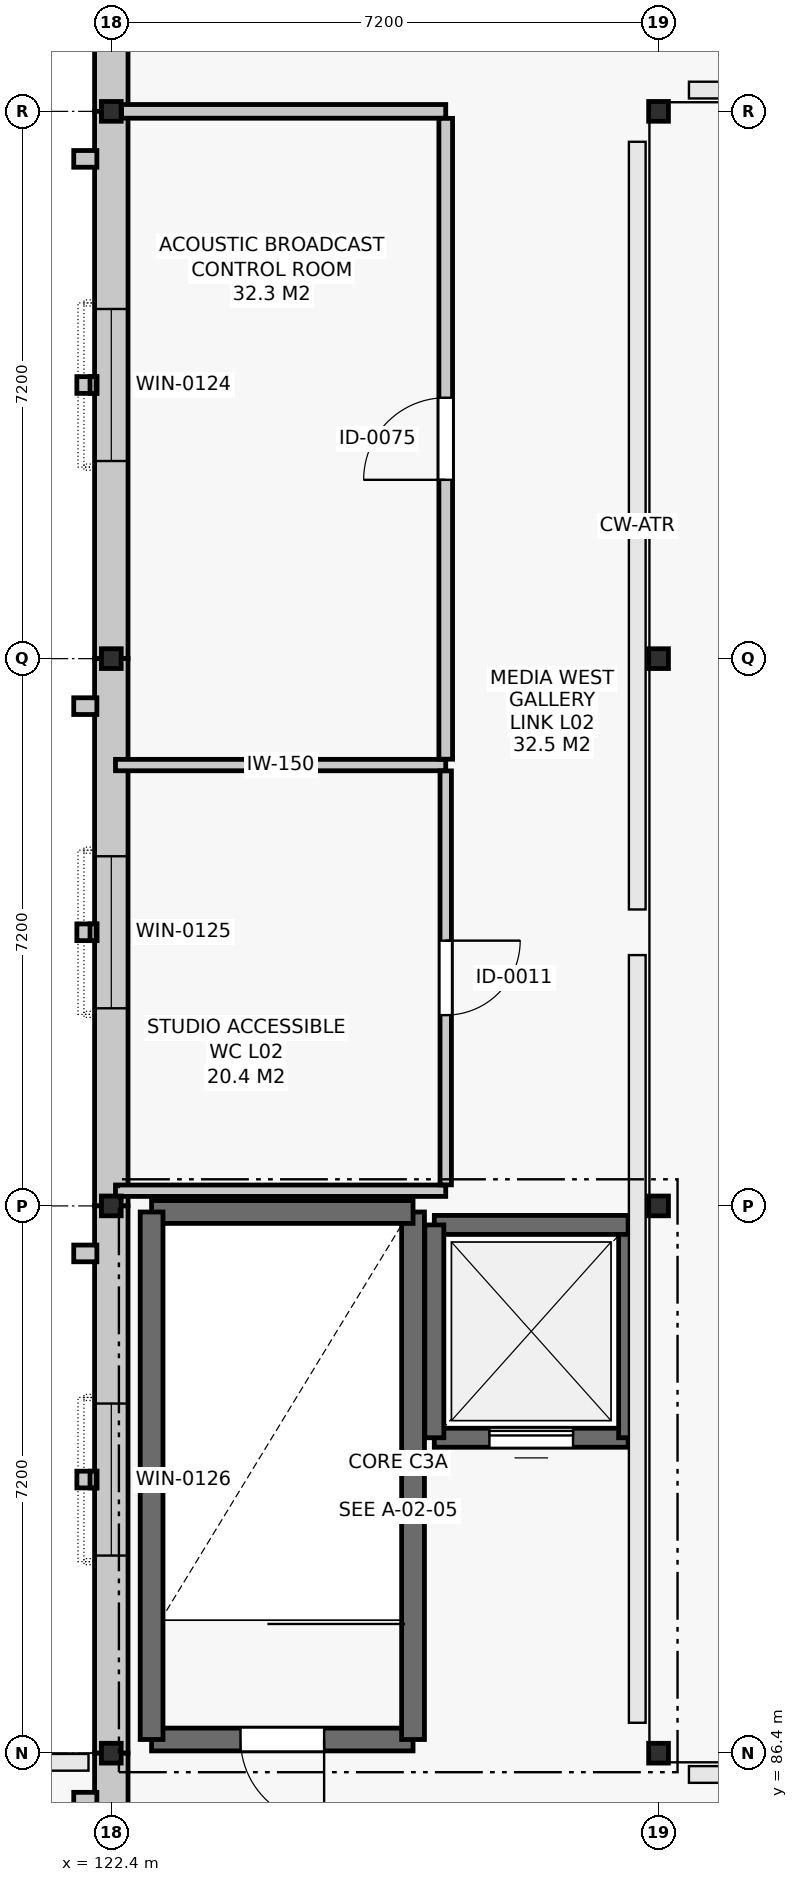
"""IFC4 building model, lengths in metres.
Left out: names, types, materials, properties, quantities, classifications, styles, units other than length and angle.
Written with IfcOpenShell. Run it as: python <this file> out.ifc"""

import sys

from ifc_helpers import new_model, si_unit, direction, frame, frame_2d, origin, origin_2d, place, context, subcontext, project, spatial, rectangle, i_section, extrude, element, fill, save


model = new_model("IFC4")
c1 = context("Model", 3, precision=1e-05, world=origin(), true_north=direction((0.0, 1.0)))
c2 = subcontext(c1, "Body", "Model", "MODEL_VIEW")
j1 = project(units=[si_unit("LENGTHUNIT", "METRE"), si_unit("PLANEANGLEUNIT", "RADIAN")], contexts=[c1])
p1 = place(None, origin())
s1 = spatial("IfcSite", under=j1, at=p1, CompositionType="ELEMENT")
p2 = place(p1, origin())
s2 = spatial("IfcBuilding", under=s1, at=p2, CompositionType="ELEMENT")
p3 = place(p2, frame((0.0, 0.0, 10.2)))
s3 = spatial("IfcBuildingStorey", under=s2, at=p3, CompositionType="ELEMENT", Elevation=10.2)
for number, where, z_axis, x_axis in (
    (1, (122.4, 86.4, 0.0), (0.0, 0.0, 1.0), (1.0, 0.0, 0.0)),
    (2, (122.4, 93.6, 0.0), (0.0, 0.0, 1.0), (1.0, 0.0, 0.0)),
    (3, (122.4, 100.8, 0.0), (0.0, 0.0, 1.0), (1.0, 0.0, 0.0)),
    (4, (122.4, 108.0, 0.0), (0.0, 0.0, 1.0), (1.0, 0.0, 0.0)),
    (5, (129.6, 86.4, 0.0), (0.0, 0.0, 1.0), (1.0, 0.0, 0.0)),
    (6, (129.6, 93.6, 0.0), (0.0, 0.0, 1.0), (1.0, 0.0, 0.0)),
    (7, (129.6, 100.8, 0.0), (0.0, 0.0, 1.0), (1.0, 0.0, 0.0)),
    (8, (129.6, 108.0, 0.0), (0.0, 0.0, 1.0), (1.0, 0.0, 0.0)),
):
    element("IfcColumn", number, at=place(p3, frame(where, z_axis=z_axis, x_axis=x_axis)), inside=s3, PredefinedType="COLUMN", context=c2, shape_type="SweptSolid", body=[
        extrude(i_section(OverallWidth=0.26, OverallDepth=0.26, WebThickness=0.01, FlangeThickness=0.018, FilletRadius=0.024, at=origin_2d()), origin(), (0.0, 0.0, 1.0), 4.2),
    ])
p4 = place(p3, frame((122.4, 115.066, 0.0), z_axis=(0.0, 0.0, 1.0), x_axis=(0.0, -1.0, 0.0)))
e9 = element("IfcWall", 9, at=p4, inside=s3, PredefinedType="SOLIDWALL", context=c2, shape_type="SweptSolid", body=[
    extrude(rectangle(XDim=7.066, YDim=0.44, at=frame_2d((3.533, 0.0))), origin(), (0.0, 0.0, 1.0), 3.24),
])
p5 = place(p4, frame((2.466, 0.0, 1.35)))
e10 = element("IfcOpeningElement", 10, at=p5, cuts=e9, PredefinedType="OPENING", context=c2, shape_type="SweptSolid", body=[
    extrude(rectangle(XDim=2.0, YDim=1.5, at=frame_2d((1.0, 0.75))), frame((0.0, 0.232, 0.0), z_axis=(0.0, -1.0, 0.0), x_axis=(1.0, 0.0, 0.0)), (0.0, 0.0, 1.0), 0.464),
])
p6 = place(p3, frame((122.4, 108.0, 0.0), z_axis=(0.0, 0.0, 1.0), x_axis=(0.0, -1.0, 0.0)))
e11 = element("IfcWall", 11, at=p6, inside=s3, PredefinedType="SOLIDWALL", context=c2, shape_type="SweptSolid", body=[
    extrude(rectangle(XDim=7.2, YDim=0.44, at=frame_2d((3.6, 0.0))), origin(), (0.0, 0.0, 1.0), 3.24),
])
p7 = place(p6, frame((2.6, 0.0, 1.35)))
e12 = element("IfcOpeningElement", 12, at=p7, cuts=e11, PredefinedType="OPENING", context=c2, shape_type="SweptSolid", body=[
    extrude(rectangle(XDim=2.0, YDim=1.5, at=frame_2d((1.0, 0.75))), frame((0.0, 0.232, 0.0), z_axis=(0.0, -1.0, 0.0), x_axis=(1.0, 0.0, 0.0)), (0.0, 0.0, 1.0), 0.464),
])
p8 = place(p3, frame((122.4, 100.8, 0.0), z_axis=(0.0, 0.0, 1.0), x_axis=(0.0, -1.0, 0.0)))
e13 = element("IfcWall", 13, at=p8, inside=s3, PredefinedType="SOLIDWALL", context=c2, shape_type="SweptSolid", body=[
    extrude(rectangle(XDim=7.2, YDim=0.44, at=frame_2d((3.6, 0.0))), origin(), (0.0, 0.0, 1.0), 3.24),
])
p9 = place(p8, frame((2.6, 0.0, 1.35)))
e14 = element("IfcOpeningElement", 14, at=p9, cuts=e13, PredefinedType="OPENING", context=c2, shape_type="SweptSolid", body=[
    extrude(rectangle(XDim=2.0, YDim=1.5, at=frame_2d((1.0, 0.75))), frame((0.0, 0.232, 0.0), z_axis=(0.0, -1.0, 0.0), x_axis=(1.0, 0.0, 0.0)), (0.0, 0.0, 1.0), 0.464),
])
p10 = place(p3, frame((122.4, 93.6, 0.0), z_axis=(0.0, 0.0, 1.0), x_axis=(0.0, -1.0, 0.0)))
e15 = element("IfcWall", 15, at=p10, inside=s3, PredefinedType="SOLIDWALL", context=c2, shape_type="SweptSolid", body=[
    extrude(rectangle(XDim=7.2, YDim=0.44, at=frame_2d((3.6, 0.0))), origin(), (0.0, 0.0, 1.0), 3.24),
])
p11 = place(p10, frame((2.6, 0.0, 1.35)))
e16 = element("IfcOpeningElement", 16, at=p11, cuts=e15, PredefinedType="OPENING", context=c2, shape_type="SweptSolid", body=[
    extrude(rectangle(XDim=2.0, YDim=1.5, at=frame_2d((1.0, 0.75))), frame((0.0, 0.232, 0.0), z_axis=(0.0, -1.0, 0.0), x_axis=(1.0, 0.0, 0.0)), (0.0, 0.0, 1.0), 0.464),
])
p12 = place(p3, frame((122.4, 86.4, 0.0), z_axis=(0.0, 0.0, 1.0), x_axis=(0.0, -1.0, 0.0)))
e17 = element("IfcWall", 17, at=p12, inside=s3, PredefinedType="SOLIDWALL", context=c2, shape_type="SweptSolid", body=[
    extrude(rectangle(XDim=7.066, YDim=0.44, at=frame_2d((3.533, 0.0))), origin(), (0.0, 0.0, 1.0), 3.24),
])
p13 = place(p12, frame((2.7, 0.0, 0.0)))
e18 = element("IfcOpeningElement", 18, at=p13, cuts=e17, PredefinedType="OPENING", context=c2, shape_type="SweptSolid", body=[
    extrude(rectangle(XDim=1.8, YDim=2.3, at=frame_2d((0.9, 1.15))), frame((0.0, 0.232, 0.0), z_axis=(0.0, -1.0, 0.0), x_axis=(1.0, 0.0, 0.0)), (0.0, 0.0, 1.0), 0.464),
])
p14 = place(p3, frame((122.93, 86.58, 0.0), z_axis=(0.0, 0.0, 1.0), x_axis=(1.0, 0.0, 0.0)))
e19 = element("IfcWall", 19, at=p14, inside=s3, PredefinedType="SHEAR", context=c2, shape_type="SweptSolid", body=[
    extrude(rectangle(XDim=3.44, YDim=0.3, at=frame_2d((1.72, 0.0))), origin(), (0.0, 0.0, 1.0), 3.96),
])
p15 = place(p14, frame((1.17, 0.0, 0.0)))
e20 = element("IfcOpeningElement", 20, at=p15, cuts=e19, PredefinedType="OPENING", context=c2, shape_type="SweptSolid", body=[
    extrude(rectangle(XDim=1.1, YDim=2.15, at=frame_2d((0.55, 1.075))), frame((0.0, 0.162, 0.0), z_axis=(0.0, -1.0, 0.0), x_axis=(1.0, 0.0, 0.0)), (0.0, 0.0, 1.0), 0.324),
])
p16 = place(p3, frame((126.37, 86.58, 0.0), z_axis=(0.0, 0.0, 1.0), x_axis=(0.0, 1.0, 0.0)))
e21 = element("IfcWall", 21, at=p16, inside=s3, PredefinedType="SHEAR", context=c2, shape_type="SweptSolid", body=[
    extrude(rectangle(XDim=6.94, YDim=0.3, at=frame_2d((3.47, 0.0))), origin(), (0.0, 0.0, 1.0), 3.96),
])
p17 = place(p3, frame((126.37, 93.52, 0.0), z_axis=(0.0, 0.0, 1.0), x_axis=(-1.0, 0.0, 0.0)))
e22 = element("IfcWall", 22, at=p17, inside=s3, PredefinedType="SHEAR", context=c2, shape_type="SweptSolid", body=[
    extrude(rectangle(XDim=3.44, YDim=0.3, at=frame_2d((1.72, 0.0))), origin(), (0.0, 0.0, 1.0), 3.96),
])
p18 = place(p3, frame((122.93, 93.52, 0.0), z_axis=(0.0, 0.0, 1.0), x_axis=(0.0, -1.0, 0.0)))
e23 = element("IfcWall", 23, at=p18, inside=s3, PredefinedType="SHEAR", context=c2, shape_type="SweptSolid", body=[
    extrude(rectangle(XDim=6.94, YDim=0.3, at=frame_2d((3.47, 0.0))), origin(), (0.0, 0.0, 1.0), 3.96),
])
p19 = place(p3, frame((126.65, 90.55, 0.0), z_axis=(0.0, 0.0, 1.0), x_axis=(1.0, 0.0, 0.0)))
e24 = element("IfcWall", 24, at=p19, inside=s3, PredefinedType="SHEAR", context=c2, shape_type="SweptSolid", body=[
    extrude(rectangle(XDim=2.55, YDim=0.25, at=frame_2d((1.275, 0.0))), origin(), (0.0, 0.0, 1.0), 3.96),
])
p20 = place(p19, frame((0.725, 0.0, 0.0)))
e25 = element("IfcOpeningElement", 25, at=p20, cuts=e24, PredefinedType="OPENING", context=c2, shape_type="SweptSolid", body=[
    extrude(rectangle(XDim=1.1, YDim=2.1, at=frame_2d((0.55, 1.05))), frame((0.0, 0.137, 0.0), z_axis=(0.0, -1.0, 0.0), x_axis=(1.0, 0.0, 0.0)), (0.0, 0.0, 1.0), 0.274),
])
p21 = place(p3, frame((129.2, 90.55, 0.0), z_axis=(0.0, 0.0, 1.0), x_axis=(0.0, 1.0, 0.0)))
e26 = element("IfcWall", 26, at=p21, inside=s3, PredefinedType="SHEAR", context=c2, shape_type="SweptSolid", body=[
    extrude(rectangle(XDim=2.8, YDim=0.25, at=frame_2d((1.4, 0.0))), origin(), (0.0, 0.0, 1.0), 3.96),
])
p22 = place(p3, frame((129.2, 93.35, 0.0), z_axis=(0.0, 0.0, 1.0), x_axis=(-1.0, 0.0, 0.0)))
e27 = element("IfcWall", 27, at=p22, inside=s3, PredefinedType="SHEAR", context=c2, shape_type="SweptSolid", body=[
    extrude(rectangle(XDim=2.55, YDim=0.25, at=frame_2d((1.275, 0.0))), origin(), (0.0, 0.0, 1.0), 3.96),
])
p23 = place(p3, frame((126.65, 93.35, 0.0), z_axis=(0.0, 0.0, 1.0), x_axis=(0.0, -1.0, 0.0)))
e28 = element("IfcWall", 28, at=p23, inside=s3, PredefinedType="SHEAR", context=c2, shape_type="SweptSolid", body=[
    extrude(rectangle(XDim=2.8, YDim=0.25, at=frame_2d((1.4, 0.0))), origin(), (0.0, 0.0, 1.0), 3.96),
])
for number, where, z_axis, x_axis in (
    (29, (122.455, 93.8, 0.0), (0.0, 0.0, 1.0), (1.0, 0.0, 0.0)),
    (30, (122.455, 99.4, 0.0), (0.0, 0.0, 1.0), (1.0, 0.0, 0.0)),
):
    element("IfcWall", number, at=place(p3, frame(where, z_axis=z_axis, x_axis=x_axis)), inside=s3, PredefinedType="PARTITIONING", context=c2, shape_type="SweptSolid", body=[
        extrude(rectangle(XDim=4.345, YDim=0.15, at=frame_2d((2.172, 0.0))), origin(), (0.0, 0.0, 1.0), 3.395),
    ])
p24 = place(p3, frame((122.534, 108.0, 0.0), z_axis=(0.0, 0.0, 1.0), x_axis=(1.0, 0.0, 0.0)))
e31 = element("IfcWall", 31, at=p24, inside=s3, PredefinedType="PARTITIONING", context=c2, shape_type="SweptSolid", body=[
    extrude(rectangle(XDim=4.266, YDim=0.18, at=frame_2d((2.133, 0.0))), origin(), (0.0, 0.0, 1.0), 3.635),
])
p25 = place(p3, frame((126.8, 93.877, 0.0), z_axis=(0.0, 0.0, 1.0), x_axis=(0.0, 1.0, 0.0)))
e32 = element("IfcWall", 32, at=p25, inside=s3, PredefinedType="PARTITIONING", context=c2, shape_type="SweptSolid", body=[
    extrude(rectangle(XDim=5.446, YDim=0.15, at=frame_2d((2.723, 0.0))), origin(), (0.0, 0.0, 1.0), 3.945),
])
p26 = place(p25, frame((2.233, 0.0, 0.0)))
e33 = element("IfcOpeningElement", 33, at=p26, cuts=e32, PredefinedType="OPENING", context=c2, shape_type="SweptSolid", body=[
    extrude(rectangle(XDim=0.98, YDim=2.1, at=frame_2d((0.49, 1.05))), frame((0.0, 0.087, 0.0), z_axis=(0.0, -1.0, 0.0), x_axis=(1.0, 0.0, 0.0)), (0.0, 0.0, 1.0), 0.174),
])
p27 = place(p3, frame((126.8, 99.477, 0.0), z_axis=(0.0, 0.0, 1.0), x_axis=(0.0, 1.0, 0.0)))
e34 = element("IfcWall", 34, at=p27, inside=s3, PredefinedType="PARTITIONING", context=c2, shape_type="SweptSolid", body=[
    extrude(rectangle(XDim=8.431, YDim=0.18, at=frame_2d((4.215, 0.0))), origin(), (0.0, 0.0, 1.0), 3.635),
])
p28 = place(p27, frame((3.676, 0.0, 0.0)))
e35 = element("IfcOpeningElement", 35, at=p28, cuts=e34, PredefinedType="OPENING", context=c2, shape_type="SweptSolid", body=[
    extrude(rectangle(XDim=1.08, YDim=2.2, at=frame_2d((0.54, 1.1))), frame((0.0, 0.102, 0.0), z_axis=(0.0, -1.0, 0.0), x_axis=(1.0, 0.0, 0.0)), (0.0, 0.0, 1.0), 0.204),
])
p29 = place(p7, origin())
e36 = element("IfcWindow", 36, at=p29, inside=s3, PartitioningType="SINGLE_PANEL", PredefinedType="WINDOW", context=c2, shape_type="SweptSolid", body=[
    extrude(rectangle(XDim=2.0, YDim=1.5, at=frame_2d((1.0, 0.75))), frame((0.0, 0.03, 0.0), z_axis=(0.0, -1.0, 0.0), x_axis=(1.0, 0.0, 0.0)), (0.0, 0.0, 1.0), 0.06),
])
fill(e12, e36)
p30 = place(p9, origin())
e37 = element("IfcWindow", 37, at=p30, inside=s3, PartitioningType="SINGLE_PANEL", PredefinedType="WINDOW", context=c2, shape_type="SweptSolid", body=[
    extrude(rectangle(XDim=2.0, YDim=1.5, at=frame_2d((1.0, 0.75))), frame((0.0, 0.03, 0.0), z_axis=(0.0, -1.0, 0.0), x_axis=(1.0, 0.0, 0.0)), (0.0, 0.0, 1.0), 0.06),
])
fill(e14, e37)
p31 = place(p11, origin())
e38 = element("IfcWindow", 38, at=p31, inside=s3, PartitioningType="SINGLE_PANEL", PredefinedType="WINDOW", context=c2, shape_type="SweptSolid", body=[
    extrude(rectangle(XDim=2.0, YDim=1.5, at=frame_2d((1.0, 0.75))), frame((0.0, 0.03, 0.0), z_axis=(0.0, -1.0, 0.0), x_axis=(1.0, 0.0, 0.0)), (0.0, 0.0, 1.0), 0.06),
])
fill(e16, e38)
p32 = place(p15, frame((1.1, 0.0, 0.0), z_axis=(0.0, 0.0, 1.0), x_axis=(-1.0, 0.0, 0.0)))
e39 = element("IfcDoor", 39, at=p32, inside=s3, OperationType="SINGLE_SWING_LEFT", PredefinedType="DOOR", context=c2, shape_type="SweptSolid", body=[
    extrude(rectangle(XDim=1.1, YDim=2.15, at=frame_2d((0.55, 1.075))), frame((0.0, 0.025, 0.0), z_axis=(0.0, -1.0, 0.0), x_axis=(1.0, 0.0, 0.0)), (0.0, 0.0, 1.0), 0.05),
])
fill(e20, e39)
p33 = place(p20, origin())
e40 = element("IfcDoor", 40, at=p33, inside=s3, OperationType="SLIDING_TO_LEFT", PredefinedType="DOOR", context=c2, shape_type="SweptSolid", body=[
    extrude(rectangle(XDim=1.1, YDim=2.1, at=frame_2d((0.55, 1.05))), frame((0.0, 0.025, 0.0), z_axis=(0.0, -1.0, 0.0), x_axis=(1.0, 0.0, 0.0)), (0.0, 0.0, 1.0), 0.05),
])
fill(e25, e40)
p34 = place(p26, frame((0.98, 0.0, 0.0), z_axis=(0.0, 0.0, 1.0), x_axis=(-1.0, 0.0, 0.0)))
e41 = element("IfcDoor", 41, at=p34, inside=s3, OperationType="SINGLE_SWING_LEFT", PredefinedType="DOOR", context=c2, shape_type="SweptSolid", body=[
    extrude(rectangle(XDim=0.98, YDim=2.1, at=frame_2d((0.49, 1.05))), frame((0.0, 0.025, 0.0), z_axis=(0.0, -1.0, 0.0), x_axis=(1.0, 0.0, 0.0)), (0.0, 0.0, 1.0), 0.05),
])
fill(e33, e41)
p35 = place(p28, origin())
e42 = element("IfcDoor", 42, at=p35, inside=s3, OperationType="SINGLE_SWING_LEFT", PredefinedType="DOOR", context=c2, shape_type="SweptSolid", body=[
    extrude(rectangle(XDim=1.08, YDim=2.2, at=frame_2d((0.54, 1.1))), frame((0.0, 0.025, 0.0), z_axis=(0.0, -1.0, 0.0), x_axis=(1.0, 0.0, 0.0)), (0.0, 0.0, 1.0), 0.05),
])
fill(e35, e42)
save(model, sys.argv[1])
